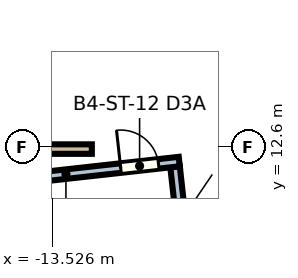
"""IFC4 building model, lengths in metres.
Left out: names, types, materials, properties, quantities, classifications, styles, units other than length and angle.
Written with IfcOpenShell. Run it as: python <this file> out.ifc"""

import sys

from ifc_helpers import new_model, si_unit, direction, frame, frame_2d, origin, place, context, subcontext, project, spatial, rectangle, extrude, element, fill, save


model = new_model("IFC4")
c1 = context("Model", 3, precision=1e-05, world=origin(), true_north=direction((0.0, 1.0)))
c2 = subcontext(c1, "Body", "Model", "MODEL_VIEW")
j1 = project(units=[si_unit("LENGTHUNIT", "METRE"), si_unit("PLANEANGLEUNIT", "RADIAN")], contexts=[c1])
p1 = place(None, origin())
s1 = spatial("IfcSite", under=j1, at=p1, CompositionType="ELEMENT")
p2 = place(p1, origin())
s2 = spatial("IfcBuilding", under=s1, at=p2, CompositionType="ELEMENT")
p3 = place(p2, frame((0.0, 0.0, -17.0)))
s3 = spatial("IfcBuildingStorey", under=s2, at=p3, CompositionType="ELEMENT", Elevation=-17.0)
p4 = place(p3, frame((-16.05, 12.6, 0.0), z_axis=(0.0, 0.0, 1.0), x_axis=(1.0, 0.0, 0.0)))
e1 = element("IfcWall", 1, at=p4, inside=s3, PredefinedType="PARTITIONING", context=c2, shape_type="SweptSolid", body=[
    extrude(rectangle(XDim=3.561, YDim=0.25, at=frame_2d((1.78, 0.0))), origin(), (0.0, 0.0, 1.0), 3.7),
])
p5 = place(p3, frame((-10.3, 12.134, 0.0), z_axis=(0.0, 0.0, 1.0), x_axis=(0.110328108544, -0.993895220063, 0.0)))
e2 = element("IfcWall", 2, at=p5, inside=s3, PredefinedType="SOLIDWALL", context=c2, shape_type="SweptSolid", body=[
    extrude(rectangle(XDim=2.85, YDim=0.25, at=frame_2d((1.425, 0.0))), origin(), (0.0, 0.0, 1.0), 3.7),
])
p6 = place(p3, frame((-16.153, 11.61, 0.0), z_axis=(0.0, 0.0, 1.0), x_axis=(0.993897125329, 0.110310943534, 0.0)))
e3 = element("IfcWall", 3, at=p6, inside=s3, PredefinedType="SOLIDWALL", context=c2, shape_type="SweptSolid", body=[
    extrude(rectangle(XDim=6.0, YDim=0.25, at=frame_2d((3.0, 0.0))), origin(), (0.0, 0.0, 1.0), 3.7),
])
p7 = place(p6, frame((4.45, 0.0, 0.0)))
e4 = element("IfcOpeningElement", 4, at=p7, cuts=e3, PredefinedType="OPENING", context=c2, shape_type="SweptSolid", body=[
    extrude(rectangle(XDim=1.0, YDim=2.1, at=frame_2d((0.5, 1.05))), frame((0.0, 0.135, 0.0), z_axis=(0.0, -1.0, 0.0), x_axis=(1.0, 0.0, 0.0)), (0.0, 0.0, 1.0), 0.27),
])
p8 = place(p7, origin())
e5 = element("IfcDoor", 5, at=p8, inside=s3, PredefinedType="DOOR", context=c2, shape_type="SweptSolid", body=[
    extrude(rectangle(XDim=1.0, YDim=2.1, at=frame_2d((0.5, 1.05))), frame((0.0, 0.025, 0.0), z_axis=(0.0, -1.0, 0.0), x_axis=(1.0, 0.0, 0.0)), (0.0, 0.0, 1.0), 0.05),
])
fill(e4, e5)
save(model, sys.argv[1])
